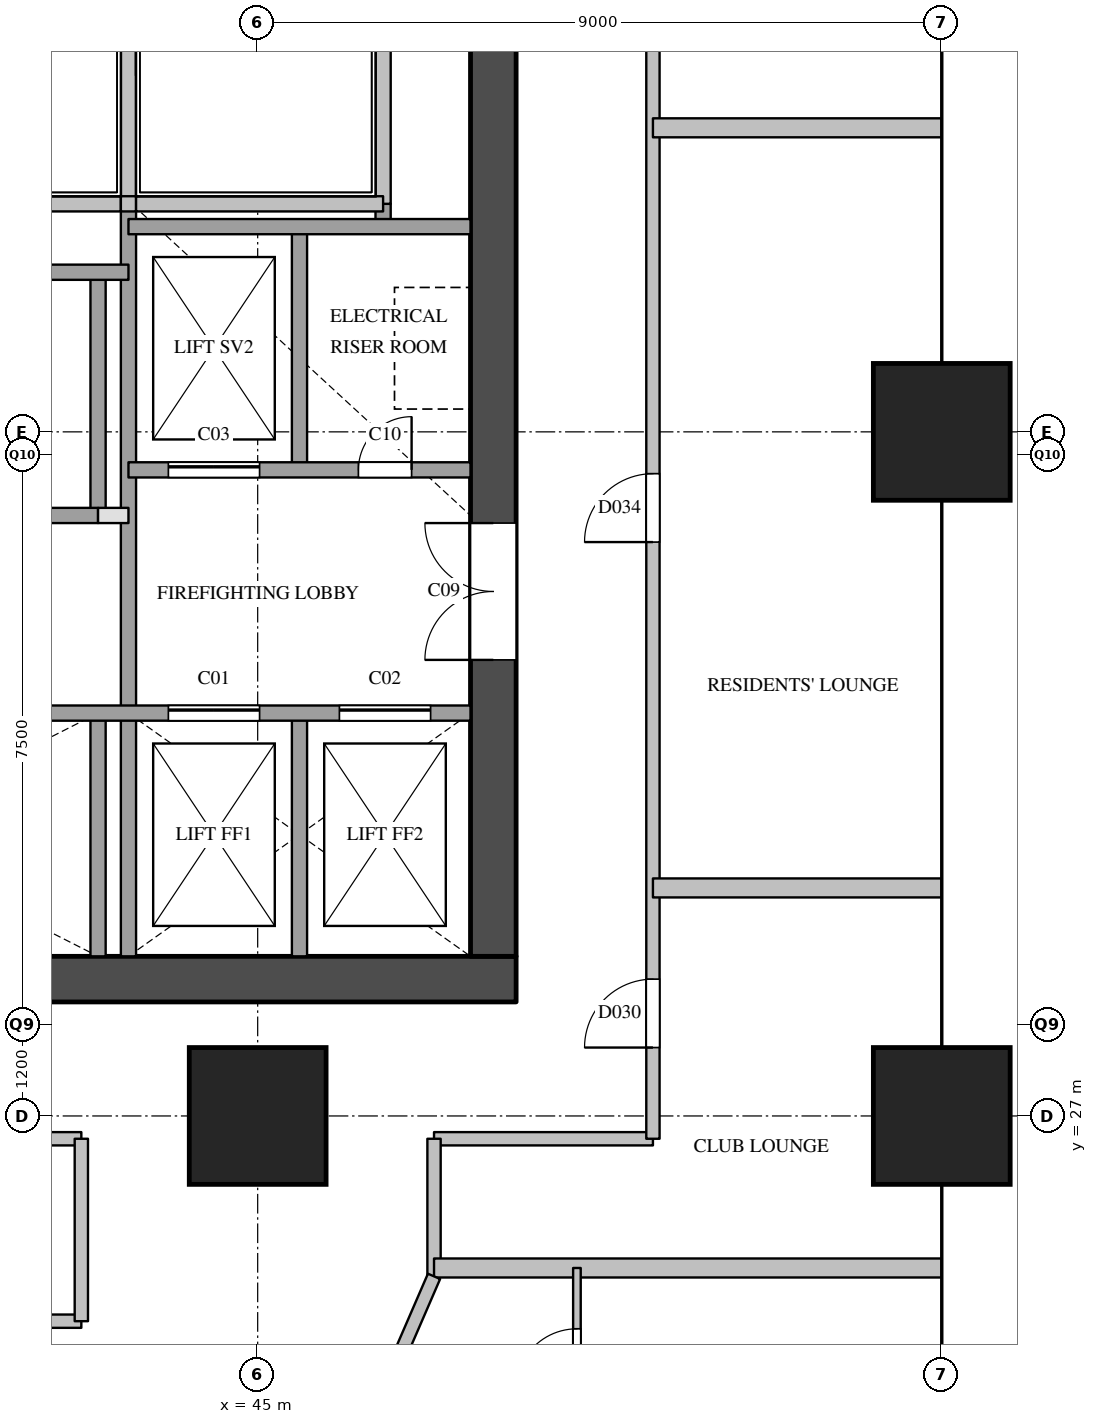
"""IFC4 building model, lengths in metres.
Left out: names, types, materials, properties, quantities, classifications, styles, units other than length and angle.
Written with IfcOpenShell. Run it as: python <this file> out.ifc"""

import sys

from ifc_helpers import new_model, si_unit, direction, frame, frame_2d, origin, origin_2d, place, context, subcontext, project, spatial, rectangle, extrude, element, fill, save


model = new_model("IFC4")
c1 = context("Model", 3, precision=1e-05, world=origin(), true_north=direction((0.0, 1.0)))
c2 = subcontext(c1, "Body", "Model", "MODEL_VIEW")
j1 = project(units=[si_unit("LENGTHUNIT", "METRE"), si_unit("PLANEANGLEUNIT", "RADIAN")], contexts=[c1])
p1 = place(None, origin())
s1 = spatial("IfcSite", under=j1, at=p1, CompositionType="ELEMENT")
p2 = place(p1, origin())
s2 = spatial("IfcBuilding", under=s1, at=p2, CompositionType="ELEMENT")
p3 = place(p2, frame((0.0, 0.0, 72.8)))
s3 = spatial("IfcBuildingStorey", under=s2, at=p3, CompositionType="ELEMENT", Elevation=72.8)
for number, where, z_axis, x_axis in (
    (1, (45.0, 27.0, 0.0), (0.0, 0.0, 1.0), (1.0, 0.0, 0.0)),
    (2, (54.0, 27.0, 0.0), (0.0, 0.0, 1.0), (1.0, 0.0, 0.0)),
    (3, (54.0, 36.0, 0.0), (0.0, 0.0, 1.0), (1.0, 0.0, 0.0)),
):
    element("IfcColumn", number, at=place(p3, frame(where, z_axis=z_axis, x_axis=x_axis)), inside=s3, PredefinedType="COLUMN", context=c2, shape_type="SweptSolid", body=[
        extrude(rectangle(XDim=1.8, YDim=1.8, at=origin_2d()), origin(), (0.0, 0.0, 1.0), 5.0),
    ])
p4 = place(p3, frame((36.0, 28.8, 0.0), z_axis=(0.0, 0.0, 1.0), x_axis=(1.0, 0.0, 0.0)))
e4 = element("IfcWall", 4, at=p4, inside=s3, PredefinedType="SHEAR", context=c2, shape_type="SweptSolid", body=[
    extrude(rectangle(XDim=12.4, YDim=0.6, at=frame_2d((6.2, 0.0))), origin(), (0.0, 0.0, 1.0), 4.7),
])
p5 = place(p3, frame((48.1, 29.1, 0.0), z_axis=(0.0, 0.0, 1.0), x_axis=(0.0, 1.0, 0.0)))
e5 = element("IfcWall", 5, at=p5, inside=s3, PredefinedType="SHEAR", context=c2, shape_type="SweptSolid", body=[
    extrude(rectangle(XDim=20.3, YDim=0.6, at=frame_2d((10.15, 0.0))), origin(), (0.0, 0.0, 1.0), 4.7),
])
p6 = place(p5, frame((12.5, 0.0, 0.0)))
e6 = element("IfcOpeningElement", 6, at=p6, cuts=e5, PredefinedType="OPENING", context=c2, shape_type="SweptSolid", body=[
    extrude(rectangle(XDim=0.7, YDim=2.1, at=frame_2d((0.35, 1.05))), frame((0.0, 0.31, 0.0), z_axis=(0.0, -1.0, 0.0), x_axis=(1.0, 0.0, 0.0)), (0.0, 0.0, 1.0), 0.62),
])
p7 = place(p5, frame((3.9, 0.0, 0.0)))
e7 = element("IfcOpeningElement", 7, at=p7, cuts=e5, PredefinedType="OPENING", context=c2, shape_type="SweptSolid", body=[
    extrude(rectangle(XDim=1.8, YDim=2.1, at=frame_2d((0.9, 1.05))), frame((0.0, 0.31, 0.0), z_axis=(0.0, -1.0, 0.0), x_axis=(1.0, 0.0, 0.0)), (0.0, 0.0, 1.0), 0.62),
])
p8 = place(p3, frame((42.9, 29.1, 0.0), z_axis=(0.0, 0.0, 1.0), x_axis=(0.0, 1.0, 0.0)))
e8 = element("IfcWall", 8, at=p8, inside=s3, PredefinedType="SOLIDWALL", context=c2, shape_type="SweptSolid", body=[
    extrude(rectangle(XDim=3.2, YDim=0.2, at=frame_2d((1.6, 0.0))), origin(), (0.0, 0.0, 1.0), 4.7),
])
p9 = place(p3, frame((42.9, 34.9, 0.0), z_axis=(0.0, 0.0, 1.0), x_axis=(0.0, 1.0, 0.0)))
e9 = element("IfcWall", 9, at=p9, inside=s3, PredefinedType="SOLIDWALL", context=c2, shape_type="SweptSolid", body=[
    extrude(rectangle(XDim=3.2, YDim=0.2, at=frame_2d((1.6, 0.0))), origin(), (0.0, 0.0, 1.0), 4.7),
])
p10 = place(p3, frame((43.3, 29.1, 0.0), z_axis=(0.0, 0.0, 1.0), x_axis=(0.0, 1.0, 0.0)))
e10 = element("IfcWall", 10, at=p10, inside=s3, PredefinedType="SOLIDWALL", context=c2, shape_type="SweptSolid", body=[
    extrude(rectangle(XDim=9.9, YDim=0.2, at=frame_2d((4.95, 0.0))), origin(), (0.0, 0.0, 1.0), 4.7),
])
p11 = place(p3, frame((43.3, 39.0, 0.0), z_axis=(0.0, 0.0, 1.0), x_axis=(0.0, 1.0, 0.0)))
e11 = element("IfcWall", 11, at=p11, inside=s3, PredefinedType="SOLIDWALL", context=c2, shape_type="SweptSolid", body=[
    extrude(rectangle(XDim=2.06, YDim=0.2, at=frame_2d((1.03, 0.0))), origin(), (0.0, 0.0, 1.0), 4.7),
])
for number, where, z_axis, x_axis in (
    (12, (45.55, 29.1, 0.0), (0.0, 0.0, 1.0), (0.0, 1.0, 0.0)),
    (13, (45.55, 35.5, 0.0), (0.0, 0.0, 1.0), (0.0, 1.0, 0.0)),
):
    element("IfcWall", number, at=place(p3, frame(where, z_axis=z_axis, x_axis=x_axis)), inside=s3, PredefinedType="SOLIDWALL", context=c2, shape_type="SweptSolid", body=[
        extrude(rectangle(XDim=3.2, YDim=0.2, at=frame_2d((1.6, 0.0))), origin(), (0.0, 0.0, 1.0), 4.7),
    ])
p12 = place(p3, frame((46.65, 38.7, 0.0), z_axis=(0.0, 0.0, 1.0), x_axis=(0.0, 1.0, 0.0)))
e14 = element("IfcWall", 14, at=p12, inside=s3, PredefinedType="SOLIDWALL", context=c2, shape_type="SweptSolid", body=[
    extrude(rectangle(XDim=0.3, YDim=0.2, at=frame_2d((0.15, 0.0))), origin(), (0.0, 0.0, 1.0), 4.7),
])
p13 = place(p3, frame((46.65, 39.0, 0.0), z_axis=(0.0, 0.0, 1.0), x_axis=(0.0, 1.0, 0.0)))
e15 = element("IfcWall", 15, at=p13, inside=s3, PredefinedType="SOLIDWALL", context=c2, shape_type="SweptSolid", body=[
    extrude(rectangle(XDim=2.06, YDim=0.2, at=frame_2d((1.03, 0.0))), origin(), (0.0, 0.0, 1.0), 4.7),
])
p14 = place(p3, frame((36.6, 32.3, 0.0), z_axis=(0.0, 0.0, 1.0), x_axis=(1.0, 0.0, 0.0)))
e16 = element("IfcWall", 16, at=p14, inside=s3, PredefinedType="SOLIDWALL", context=c2, shape_type="SweptSolid", body=[
    extrude(rectangle(XDim=11.2, YDim=0.2, at=frame_2d((5.6, 0.0))), origin(), (0.0, 0.0, 1.0), 4.7),
])
p15 = place(p14, frame((7.225, 0.0, 0.0)))
e17 = element("IfcOpeningElement", 17, at=p15, cuts=e16, PredefinedType="OPENING", context=c2, shape_type="SweptSolid", body=[
    extrude(rectangle(XDim=1.2, YDim=2.1, at=frame_2d((0.6, 1.05))), frame((0.0, 0.11, 0.0), z_axis=(0.0, -1.0, 0.0), x_axis=(1.0, 0.0, 0.0)), (0.0, 0.0, 1.0), 0.22),
])
p16 = place(p14, frame((9.475, 0.0, 0.0)))
e18 = element("IfcOpeningElement", 18, at=p16, cuts=e16, PredefinedType="OPENING", context=c2, shape_type="SweptSolid", body=[
    extrude(rectangle(XDim=1.2, YDim=2.1, at=frame_2d((0.6, 1.05))), frame((0.0, 0.11, 0.0), z_axis=(0.0, -1.0, 0.0), x_axis=(1.0, 0.0, 0.0)), (0.0, 0.0, 1.0), 0.22),
])
p17 = place(p3, frame((42.9, 34.9, 0.0), z_axis=(0.0, 0.0, 1.0), x_axis=(1.0, 0.0, 0.0)))
e19 = element("IfcWall", 19, at=p17, inside=s3, PredefinedType="PARTITIONING", context=c2, shape_type="SweptSolid", body=[
    extrude(rectangle(XDim=0.4, YDim=0.2, at=frame_2d((0.2, 0.0))), origin(), (0.0, 0.0, 1.0), 4.7),
])
p18 = place(p3, frame((36.6, 34.9, 0.0), z_axis=(0.0, 0.0, 1.0), x_axis=(1.0, 0.0, 0.0)))
e20 = element("IfcWall", 20, at=p18, inside=s3, PredefinedType="SOLIDWALL", context=c2, shape_type="SweptSolid", body=[
    extrude(rectangle(XDim=6.3, YDim=0.2, at=frame_2d((3.15, 0.0))), origin(), (0.0, 0.0, 1.0), 4.7),
])
p19 = place(p3, frame((43.3, 35.5, 0.0), z_axis=(0.0, 0.0, 1.0), x_axis=(1.0, 0.0, 0.0)))
e21 = element("IfcWall", 21, at=p19, inside=s3, PredefinedType="SOLIDWALL", context=c2, shape_type="SweptSolid", body=[
    extrude(rectangle(XDim=4.5, YDim=0.2, at=frame_2d((2.25, 0.0))), origin(), (0.0, 0.0, 1.0), 4.7),
])
p20 = place(p19, frame((0.525, 0.0, 0.0)))
e22 = element("IfcOpeningElement", 22, at=p20, cuts=e21, PredefinedType="OPENING", context=c2, shape_type="SweptSolid", body=[
    extrude(rectangle(XDim=1.2, YDim=2.1, at=frame_2d((0.6, 1.05))), frame((0.0, 0.11, 0.0), z_axis=(0.0, -1.0, 0.0), x_axis=(1.0, 0.0, 0.0)), (0.0, 0.0, 1.0), 0.22),
])
p21 = place(p19, frame((3.025, 0.0, 0.0)))
e23 = element("IfcOpeningElement", 23, at=p21, cuts=e21, PredefinedType="OPENING", context=c2, shape_type="SweptSolid", body=[
    extrude(rectangle(XDim=0.7, YDim=2.1, at=frame_2d((0.35, 1.05))), frame((0.0, 0.11, 0.0), z_axis=(0.0, -1.0, 0.0), x_axis=(1.0, 0.0, 0.0)), (0.0, 0.0, 1.0), 0.22),
])
p22 = place(p3, frame((36.6, 38.1, 0.0), z_axis=(0.0, 0.0, 1.0), x_axis=(1.0, 0.0, 0.0)))
e24 = element("IfcWall", 24, at=p22, inside=s3, PredefinedType="SOLIDWALL", context=c2, shape_type="SweptSolid", body=[
    extrude(rectangle(XDim=6.7, YDim=0.2, at=frame_2d((3.35, 0.0))), origin(), (0.0, 0.0, 1.0), 4.7),
])
p23 = place(p3, frame((43.3, 38.7, 0.0), z_axis=(0.0, 0.0, 1.0), x_axis=(1.0, 0.0, 0.0)))
e25 = element("IfcWall", 25, at=p23, inside=s3, PredefinedType="SOLIDWALL", context=c2, shape_type="SweptSolid", body=[
    extrude(rectangle(XDim=4.5, YDim=0.2, at=frame_2d((2.25, 0.0))), origin(), (0.0, 0.0, 1.0), 4.7),
])
p24 = place(p3, frame((40.05, 39.0, 0.0), z_axis=(0.0, 0.0, 1.0), x_axis=(1.0, 0.0, 0.0)))
e26 = element("IfcWall", 26, at=p24, inside=s3, PredefinedType="SOLIDWALL", context=c2, shape_type="SweptSolid", body=[
    extrude(rectangle(XDim=3.15, YDim=0.2, at=frame_2d((1.575, 0.0))), origin(), (0.0, 0.0, 1.0), 4.7),
])
p25 = place(p3, frame((43.2, 39.0, 0.0), z_axis=(0.0, 0.0, 1.0), x_axis=(1.0, 0.0, 0.0)))
e27 = element("IfcWall", 27, at=p25, inside=s3, PredefinedType="SOLIDWALL", context=c2, shape_type="SweptSolid", body=[
    extrude(rectangle(XDim=0.2, YDim=0.2, at=frame_2d((0.1, 0.0))), origin(), (0.0, 0.0, 1.0), 4.7),
])
p26 = place(p3, frame((43.4, 39.0, 0.0), z_axis=(0.0, 0.0, 1.0), x_axis=(1.0, 0.0, 0.0)))
e28 = element("IfcWall", 28, at=p26, inside=s3, PredefinedType="SOLIDWALL", context=c2, shape_type="SweptSolid", body=[
    extrude(rectangle(XDim=3.25, YDim=0.2, at=frame_2d((1.625, 0.0))), origin(), (0.0, 0.0, 1.0), 4.7),
])
p27 = place(p3, frame((38.32, 24.3, 0.0), z_axis=(0.0, 0.0, 1.0), x_axis=(1.0, 0.0, 0.0)))
e29 = element("IfcWall", 29, at=p27, inside=s3, PredefinedType="PARTITIONING", context=c2, shape_type="SweptSolid", body=[
    extrude(rectangle(XDim=4.36, YDim=0.175, at=frame_2d((2.18, 0.0))), origin(), (0.0, 0.0, 1.0), 4.7),
])
p28 = place(p27, frame((1.68, 0.0, 0.0)))
e30 = element("IfcOpeningElement", 30, at=p28, cuts=e29, PredefinedType="OPENING", context=c2, shape_type="SweptSolid", body=[
    extrude(rectangle(XDim=1.0, YDim=2.1, at=frame_2d((0.5, 1.05))), frame((0.0, 0.097, 0.0), z_axis=(0.0, -1.0, 0.0), x_axis=(1.0, 0.0, 0.0)), (0.0, 0.0, 1.0), 0.195),
])
p29 = place(p3, frame((38.32, 26.7, 0.0), z_axis=(0.0, 0.0, 1.0), x_axis=(1.0, 0.0, 0.0)))
e31 = element("IfcWall", 31, at=p29, inside=s3, PredefinedType="PARTITIONING", context=c2, shape_type="SweptSolid", body=[
    extrude(rectangle(XDim=4.36, YDim=0.175, at=frame_2d((2.18, 0.0))), origin(), (0.0, 0.0, 1.0), 3.7),
])
p30 = place(p3, frame((47.32, 26.7, 0.0), z_axis=(0.0, 0.0, 1.0), x_axis=(1.0, 0.0, 0.0)))
e32 = element("IfcWall", 32, at=p30, inside=s3, PredefinedType="PARTITIONING", context=c2, shape_type="SweptSolid", body=[
    extrude(rectangle(XDim=2.88, YDim=0.175, at=frame_2d((1.44, 0.0))), origin(), (0.0, 0.0, 1.0), 3.7),
])
p31 = place(p3, frame((42.68, 24.3, 0.0), z_axis=(0.0, 0.0, 1.0), x_axis=(0.0, 1.0, 0.0)))
e33 = element("IfcWall", 33, at=p31, inside=s3, PredefinedType="PARTITIONING", context=c2, shape_type="SweptSolid", body=[
    extrude(rectangle(XDim=2.4, YDim=0.175, at=frame_2d((1.2, 0.0))), origin(), (0.0, 0.0, 1.0), 3.7),
])
p32 = place(p3, frame((47.32, 24.89, 0.0), z_axis=(0.0, 0.0, 1.0), x_axis=(0.0, 1.0, 0.0)))
e34 = element("IfcWall", 34, at=p32, inside=s3, PredefinedType="PARTITIONING", context=c2, shape_type="SweptSolid", body=[
    extrude(rectangle(XDim=1.81, YDim=0.175, at=frame_2d((0.905, 0.0))), origin(), (0.0, 0.0, 1.0), 3.7),
])
p33 = place(p3, frame((50.2, 26.7, 0.0), z_axis=(0.0, 0.0, 1.0), x_axis=(0.0, 1.0, 0.0)))
e35 = element("IfcWall", 35, at=p33, inside=s3, PredefinedType="PARTITIONING", context=c2, shape_type="SweptSolid", body=[
    extrude(rectangle(XDim=25.1, YDim=0.175, at=frame_2d((12.55, 0.0))), origin(), (0.0, 0.0, 1.0), 3.7),
])
p34 = place(p33, frame((1.2, 0.0, 0.0)))
e36 = element("IfcOpeningElement", 36, at=p34, cuts=e35, PredefinedType="OPENING", context=c2, shape_type="SweptSolid", body=[
    extrude(rectangle(XDim=0.9, YDim=2.1, at=frame_2d((0.45, 1.05))), frame((0.0, 0.097, 0.0), z_axis=(0.0, -1.0, 0.0), x_axis=(1.0, 0.0, 0.0)), (0.0, 0.0, 1.0), 0.195),
])
p35 = place(p33, frame((7.85, 0.0, 0.0)))
e37 = element("IfcOpeningElement", 37, at=p35, cuts=e35, PredefinedType="OPENING", context=c2, shape_type="SweptSolid", body=[
    extrude(rectangle(XDim=0.9, YDim=2.1, at=frame_2d((0.45, 1.05))), frame((0.0, 0.097, 0.0), z_axis=(0.0, -1.0, 0.0), x_axis=(1.0, 0.0, 0.0)), (0.0, 0.0, 1.0), 0.195),
])
p36 = place(p33, frame((15.35, 0.0, 0.0)))
e38 = element("IfcOpeningElement", 38, at=p36, cuts=e35, PredefinedType="OPENING", context=c2, shape_type="SweptSolid", body=[
    extrude(rectangle(XDim=0.9, YDim=2.1, at=frame_2d((0.45, 1.05))), frame((0.0, 0.097, 0.0), z_axis=(0.0, -1.0, 0.0), x_axis=(1.0, 0.0, 0.0)), (0.0, 0.0, 1.0), 0.195),
])
p37 = place(p33, frame((21.25, 0.0, 0.0)))
e39 = element("IfcOpeningElement", 39, at=p37, cuts=e35, PredefinedType="OPENING", context=c2, shape_type="SweptSolid", body=[
    extrude(rectangle(XDim=0.9, YDim=2.1, at=frame_2d((0.45, 1.05))), frame((0.0, 0.097, 0.0), z_axis=(0.0, -1.0, 0.0), x_axis=(1.0, 0.0, 0.0)), (0.0, 0.0, 1.0), 0.195),
])
p38 = place(p3, frame((47.32, 25.0, 0.0), z_axis=(0.0, 0.0, 1.0), x_axis=(1.0, 0.0, 0.0)))
e40 = element("IfcWall", 40, at=p38, inside=s3, PredefinedType="PARTITIONING", context=c2, shape_type="SweptSolid", body=[
    extrude(rectangle(XDim=6.68, YDim=0.25, at=frame_2d((3.34, 0.0))), origin(), (0.0, 0.0, 1.0), 3.7),
])
for number, where, z_axis, x_axis in (
    (41, (50.2, 30.0, 0.0), (0.0, 0.0, 1.0), (1.0, 0.0, 0.0)),
    (42, (50.2, 40.0, 0.0), (0.0, 0.0, 1.0), (1.0, 0.0, 0.0)),
):
    element("IfcWall", number, at=place(p3, frame(where, z_axis=z_axis, x_axis=x_axis)), inside=s3, PredefinedType="PARTITIONING", context=c2, shape_type="SweptSolid", body=[
        extrude(rectangle(XDim=3.8, YDim=0.25, at=frame_2d((1.9, 0.0))), origin(), (0.0, 0.0, 1.0), 3.7),
    ])
p39 = place(p3, frame((49.2, 22.6, 0.0), z_axis=(0.0, 0.0, 1.0), x_axis=(0.0, 1.0, 0.0)))
e43 = element("IfcWall", 43, at=p39, inside=s3, PredefinedType="PARTITIONING", context=c2, shape_type="SweptSolid", body=[
    extrude(rectangle(XDim=2.4, YDim=0.1, at=frame_2d((1.2, 0.0))), origin(), (0.0, 0.0, 1.0), 4.7),
])
p40 = place(p39, frame((0.8, 0.0, 0.0)))
e44 = element("IfcOpeningElement", 44, at=p40, cuts=e43, PredefinedType="OPENING", context=c2, shape_type="SweptSolid", body=[
    extrude(rectangle(XDim=0.8, YDim=2.1, at=frame_2d((0.4, 1.05))), frame((0.0, 0.06, 0.0), z_axis=(0.0, -1.0, 0.0), x_axis=(1.0, 0.0, 0.0)), (0.0, 0.0, 1.0), 0.12),
])
p41 = place(p3, frame((47.32, 24.89, 0.0), z_axis=(0.0, 0.0, 1.0), x_axis=(-0.397633632391, -0.917544273804, 0.0)))
e45 = element("IfcWall", 45, at=p41, inside=s3, PredefinedType="PARTITIONING", context=c2, shape_type="SweptSolid", body=[
    extrude(rectangle(XDim=1.308, YDim=0.175, at=frame_2d((0.654, 0.0))), origin(), (0.0, 0.0, 1.0), 4.7),
])
p42 = place(p15, origin())
e46 = element("IfcDoor", 46, at=p42, inside=s3, OperationType="SLIDING_TO_LEFT", PredefinedType="DOOR", context=c2, shape_type="SweptSolid", body=[
    extrude(rectangle(XDim=1.2, YDim=2.1, at=frame_2d((0.6, 1.05))), frame((0.0, 0.025, 0.0), z_axis=(0.0, -1.0, 0.0), x_axis=(1.0, 0.0, 0.0)), (0.0, 0.0, 1.0), 0.05),
])
fill(e17, e46)
p43 = place(p16, origin())
e47 = element("IfcDoor", 47, at=p43, inside=s3, OperationType="SLIDING_TO_LEFT", PredefinedType="DOOR", context=c2, shape_type="SweptSolid", body=[
    extrude(rectangle(XDim=1.2, YDim=2.1, at=frame_2d((0.6, 1.05))), frame((0.0, 0.025, 0.0), z_axis=(0.0, -1.0, 0.0), x_axis=(1.0, 0.0, 0.0)), (0.0, 0.0, 1.0), 0.05),
])
fill(e18, e47)
p44 = place(p20, origin())
e48 = element("IfcDoor", 48, at=p44, inside=s3, OperationType="SLIDING_TO_LEFT", PredefinedType="DOOR", context=c2, shape_type="SweptSolid", body=[
    extrude(rectangle(XDim=1.2, YDim=2.1, at=frame_2d((0.6, 1.05))), frame((0.0, 0.025, 0.0), z_axis=(0.0, -1.0, 0.0), x_axis=(1.0, 0.0, 0.0)), (0.0, 0.0, 1.0), 0.05),
])
fill(e22, e48)
p45 = place(p7, origin())
e49 = element("IfcDoor", 49, at=p45, inside=s3, OperationType="DOUBLE_DOOR_SINGLE_SWING", PredefinedType="DOOR", context=c2, shape_type="SweptSolid", body=[
    extrude(rectangle(XDim=1.8, YDim=2.1, at=frame_2d((0.9, 1.05))), frame((0.0, 0.025, 0.0), z_axis=(0.0, -1.0, 0.0), x_axis=(1.0, 0.0, 0.0)), (0.0, 0.0, 1.0), 0.05),
])
fill(e7, e49)
p46 = place(p21, origin())
e50 = element("IfcDoor", 50, at=p46, inside=s3, OperationType="SINGLE_SWING_RIGHT", PredefinedType="DOOR", context=c2, shape_type="SweptSolid", body=[
    extrude(rectangle(XDim=0.7, YDim=2.1, at=frame_2d((0.35, 1.05))), frame((0.0, 0.025, 0.0), z_axis=(0.0, -1.0, 0.0), x_axis=(1.0, 0.0, 0.0)), (0.0, 0.0, 1.0), 0.05),
])
fill(e23, e50)
p47 = place(p40, origin())
e51 = element("IfcDoor", 51, at=p47, inside=s3, OperationType="SINGLE_SWING_LEFT", PredefinedType="DOOR", context=c2, shape_type="SweptSolid", body=[
    extrude(rectangle(XDim=0.8, YDim=2.1, at=frame_2d((0.4, 1.05))), frame((0.0, 0.025, 0.0), z_axis=(0.0, -1.0, 0.0), x_axis=(1.0, 0.0, 0.0)), (0.0, 0.0, 1.0), 0.05),
])
fill(e44, e51)
p48 = place(p34, origin())
e52 = element("IfcDoor", 52, at=p48, inside=s3, OperationType="SINGLE_SWING_LEFT", PredefinedType="DOOR", context=c2, shape_type="SweptSolid", body=[
    extrude(rectangle(XDim=0.9, YDim=2.1, at=frame_2d((0.45, 1.05))), frame((0.0, 0.025, 0.0), z_axis=(0.0, -1.0, 0.0), x_axis=(1.0, 0.0, 0.0)), (0.0, 0.0, 1.0), 0.05),
])
fill(e36, e52)
p49 = place(p35, origin())
e53 = element("IfcDoor", 53, at=p49, inside=s3, OperationType="SINGLE_SWING_LEFT", PredefinedType="DOOR", context=c2, shape_type="SweptSolid", body=[
    extrude(rectangle(XDim=0.9, YDim=2.1, at=frame_2d((0.45, 1.05))), frame((0.0, 0.025, 0.0), z_axis=(0.0, -1.0, 0.0), x_axis=(1.0, 0.0, 0.0)), (0.0, 0.0, 1.0), 0.05),
])
fill(e37, e53)
save(model, sys.argv[1])
